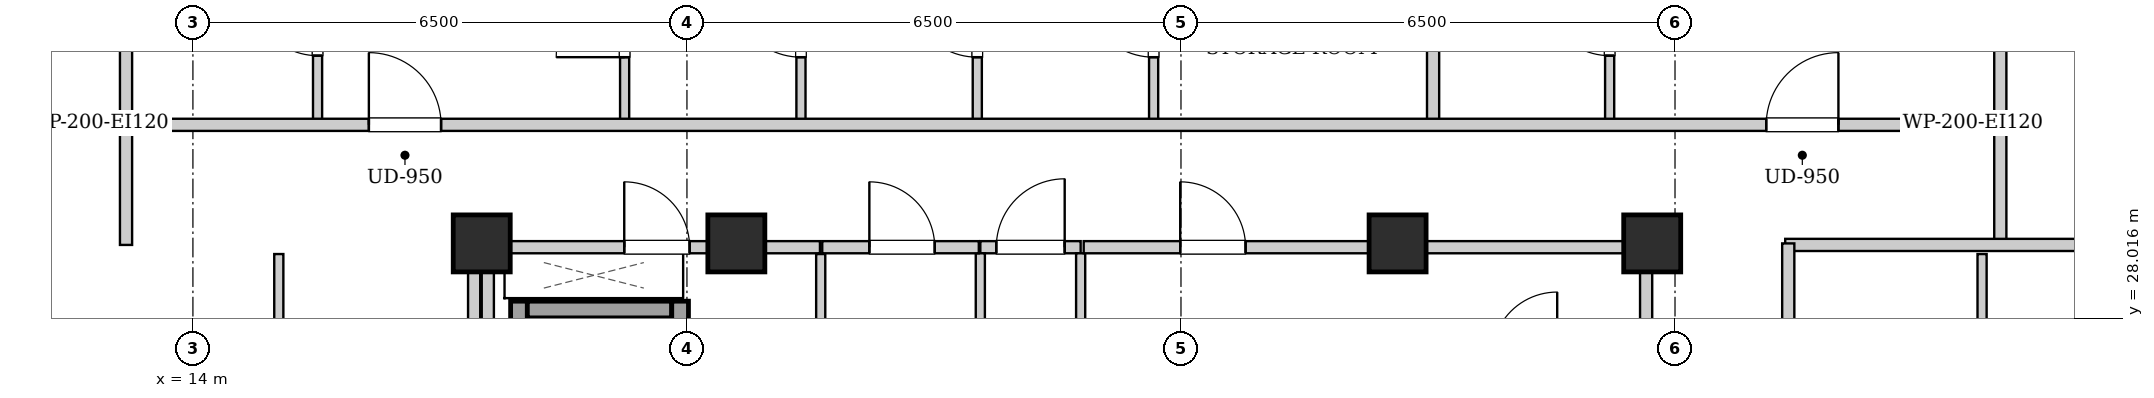
"""IFC4 building model, lengths in metres.
Left out: names, types, materials, properties, quantities, classifications, styles, units other than length and angle.
Written with IfcOpenShell. Run it as: python <this file> out.ifc"""

import sys

from ifc_helpers import new_model, si_unit, direction, frame, frame_2d, origin, origin_2d, place, context, subcontext, project, spatial, rectangle, extrude, element, fill, save


model = new_model("IFC4")
c1 = context("Model", 3, precision=1e-05, world=origin(), true_north=direction((0.0, 1.0)))
c2 = subcontext(c1, "Body", "Model", "MODEL_VIEW")
j1 = project(units=[si_unit("LENGTHUNIT", "METRE"), si_unit("PLANEANGLEUNIT", "RADIAN")], contexts=[c1])
p1 = place(None, origin())
s1 = spatial("IfcSite", under=j1, at=p1, CompositionType="ELEMENT")
p2 = place(p1, origin())
s2 = spatial("IfcBuilding", under=s1, at=p2, CompositionType="ELEMENT")
p3 = place(p2, frame((0.0, 0.0, 258.1)))
s3 = spatial("IfcBuildingStorey", under=s2, at=p3, CompositionType="ELEMENT", Elevation=258.1)
for number, where, z_axis, x_axis in (
    (1, (17.8, 29.0, 0.0), (0.0, 0.0, 1.0), (1.0, 0.0, 0.0)),
    (2, (21.15, 29.0, 0.0), (0.0, 0.0, 1.0), (1.0, 0.0, 0.0)),
    (3, (29.85, 29.0, 0.0), (0.0, 0.0, 1.0), (1.0, 0.0, 0.0)),
    (4, (33.2, 29.0, 0.0), (0.0, 0.0, 1.0), (1.0, 0.0, 0.0)),
):
    element("IfcColumn", number, at=place(p3, frame(where, z_axis=z_axis, x_axis=x_axis)), inside=s3, PredefinedType="COLUMN", context=c2, shape_type="SweptSolid", body=[
        extrude(rectangle(XDim=0.75, YDim=0.75, at=origin_2d()), origin(), (0.0, 0.0, 1.0), 3.4),
    ])
p4 = place(p3, frame((18.29, 24.1, 0.0), z_axis=(0.0, 0.0, 1.0), x_axis=(0.0, 1.0, 0.0)))
e5 = element("IfcWall", 5, at=p4, inside=s3, PredefinedType="SHEAR", context=c2, shape_type="SweptSolid", body=[
    extrude(rectangle(XDim=4.14, YDim=0.22, at=frame_2d((2.07, 0.0))), origin(), (0.0, 0.0, 1.0), 3.05),
])
p5 = place(p3, frame((18.4, 28.13, 0.0), z_axis=(0.0, 0.0, 1.0), x_axis=(1.0, 0.0, 0.0)))
e6 = element("IfcWall", 6, at=p5, inside=s3, PredefinedType="SHEAR", context=c2, shape_type="SweptSolid", body=[
    extrude(rectangle(XDim=1.9, YDim=0.22, at=frame_2d((0.95, 0.0))), origin(), (0.0, 0.0, 1.0), 3.05),
])
p6 = place(p3, frame((20.41, 26.06, 0.0), z_axis=(0.0, 0.0, 1.0), x_axis=(0.0, 1.0, 0.0)))
e7 = element("IfcWall", 7, at=p6, inside=s3, PredefinedType="SHEAR", context=c2, shape_type="SweptSolid", body=[
    extrude(rectangle(XDim=2.18, YDim=0.22, at=frame_2d((1.09, 0.0))), origin(), (0.0, 0.0, 1.0), 3.05),
])
p7 = place(p6, frame((0.54, 0.0, 0.0)))
e8 = element("IfcOpeningElement", 8, at=p7, cuts=e7, PredefinedType="OPENING", context=c2, shape_type="SweptSolid", body=[
    extrude(rectangle(XDim=1.1, YDim=2.15, at=frame_2d((0.55, 1.075))), frame((0.0, 0.12, 0.0), z_axis=(0.0, -1.0, 0.0), x_axis=(1.0, 0.0, 0.0)), (0.0, 0.0, 1.0), 0.24),
])
for number, where, z_axis, x_axis in (
    (9, (17.88, 24.12, 0.0), (0.0, 0.0, 1.0), (0.0, 1.0, 0.0)),
    (10, (33.12, 24.12, 0.0), (0.0, 0.0, 1.0), (0.0, 1.0, 0.0)),
):
    element("IfcWall", number, at=place(p3, frame(where, z_axis=z_axis, x_axis=x_axis)), inside=s3, PredefinedType="PARTITIONING", context=c2, shape_type="SweptSolid", body=[
        extrude(rectangle(XDim=4.76, YDim=0.16, at=frame_2d((2.38, 0.0))), origin(), (0.0, 0.0, 1.0), 2.385),
    ])
p8 = place(p3, frame((24.36, 28.95, 0.0), z_axis=(0.0, 0.0, 1.0), x_axis=(1.0, 0.0, 0.0)))
e11 = element("IfcWall", 11, at=p8, inside=s3, PredefinedType="PARTITIONING", context=c2, shape_type="SweptSolid", body=[
    extrude(rectangle(XDim=1.32, YDim=0.16, at=frame_2d((0.66, 0.0))), origin(), (0.0, 0.0, 1.0), 2.578),
])
p9 = place(p8, frame((0.21, 0.0, 0.0)))
e12 = element("IfcOpeningElement", 12, at=p9, cuts=e11, PredefinedType="OPENING", context=c2, shape_type="SweptSolid", body=[
    extrude(rectangle(XDim=0.9, YDim=2.05, at=frame_2d((0.45, 1.025))), frame((0.0, 0.09, 0.0), z_axis=(0.0, -1.0, 0.0), x_axis=(1.0, 0.0, 0.0)), (0.0, 0.0, 1.0), 0.18),
])
p10 = place(p3, frame((17.96, 28.95, 0.0), z_axis=(0.0, 0.0, 1.0), x_axis=(1.0, 0.0, 0.0)))
e13 = element("IfcWall", 13, at=p10, inside=s3, PredefinedType="PARTITIONING", context=c2, shape_type="SweptSolid", body=[
    extrude(rectangle(XDim=4.29, YDim=0.16, at=frame_2d((2.145, 0.0))), origin(), (0.0, 0.0, 1.0), 2.578),
])
p11 = place(p10, frame((1.715, 0.0, 0.0)))
e14 = element("IfcOpeningElement", 14, at=p11, cuts=e13, PredefinedType="OPENING", context=c2, shape_type="SweptSolid", body=[
    extrude(rectangle(XDim=0.86, YDim=2.05, at=frame_2d((0.43, 1.025))), frame((0.0, 0.09, 0.0), z_axis=(0.0, -1.0, 0.0), x_axis=(1.0, 0.0, 0.0)), (0.0, 0.0, 1.0), 0.18),
])
for number, where, z_axis, x_axis in (
    (15, (24.36, 25.0, 0.0), (0.0, 0.0, 1.0), (0.0, 1.0, 0.0)),
    (16, (25.68, 25.0, 0.0), (0.0, 0.0, 1.0), (0.0, 1.0, 0.0)),
):
    element("IfcWall", number, at=place(p3, frame(where, z_axis=z_axis, x_axis=x_axis)), inside=s3, PredefinedType="PARTITIONING", context=c2, shape_type="SweptSolid", body=[
        extrude(rectangle(XDim=3.87, YDim=0.12, at=frame_2d((1.935, 0.0))), origin(), (0.0, 0.0, 1.0), 3.05),
    ])
p12 = place(p3, frame((22.26, 25.0, 0.0), z_axis=(0.0, 0.0, 1.0), x_axis=(0.0, 1.0, 0.0)))
e17 = element("IfcWall", 17, at=p12, inside=s3, PredefinedType="PARTITIONING", context=c2, shape_type="SweptSolid", body=[
    extrude(rectangle(XDim=3.86, YDim=0.12, at=frame_2d((1.93, 0.0))), origin(), (0.0, 0.0, 1.0), 3.05),
])
p13 = place(p3, frame((22.28, 28.95, 0.0), z_axis=(0.0, 0.0, 1.0), x_axis=(1.0, 0.0, 0.0)))
e18 = element("IfcWall", 18, at=p13, inside=s3, PredefinedType="PARTITIONING", context=c2, shape_type="SweptSolid", body=[
    extrude(rectangle(XDim=2.06, YDim=0.16, at=frame_2d((1.03, 0.0))), origin(), (0.0, 0.0, 1.0), 2.578),
])
p14 = place(p13, frame((0.62, 0.0, 0.0)))
e19 = element("IfcOpeningElement", 19, at=p14, cuts=e18, PredefinedType="OPENING", context=c2, shape_type="SweptSolid", body=[
    extrude(rectangle(XDim=0.86, YDim=2.05, at=frame_2d((0.43, 1.025))), frame((0.0, 0.09, 0.0), z_axis=(0.0, -1.0, 0.0), x_axis=(1.0, 0.0, 0.0)), (0.0, 0.0, 1.0), 0.18),
])
p15 = place(p3, frame((25.72, 28.95, 0.0), z_axis=(0.0, 0.0, 1.0), x_axis=(1.0, 0.0, 0.0)))
e20 = element("IfcWall", 20, at=p15, inside=s3, PredefinedType="PARTITIONING", context=c2, shape_type="SweptSolid", body=[
    extrude(rectangle(XDim=7.32, YDim=0.16, at=frame_2d((3.66, 0.0))), origin(), (0.0, 0.0, 1.0), 2.578),
])
p16 = place(p15, frame((1.27, 0.0, 0.0)))
e21 = element("IfcOpeningElement", 21, at=p16, cuts=e20, PredefinedType="OPENING", context=c2, shape_type="SweptSolid", body=[
    extrude(rectangle(XDim=0.86, YDim=2.05, at=frame_2d((0.43, 1.025))), frame((0.0, 0.09, 0.0), z_axis=(0.0, -1.0, 0.0), x_axis=(1.0, 0.0, 0.0)), (0.0, 0.0, 1.0), 0.18),
])
for number, where, z_axis, x_axis in (
    (22, (13.12, 28.98, 0.0), (0.0, 0.0, 1.0), (0.0, 1.0, 0.0)),
    (23, (37.78, 28.98, 0.0), (0.0, 0.0, 1.0), (0.0, 1.0, 0.0)),
):
    element("IfcWall", number, at=place(p3, frame(where, z_axis=z_axis, x_axis=x_axis)), inside=s3, PredefinedType="PARTITIONING", context=c2, shape_type="SweptSolid", body=[
        extrude(rectangle(XDim=1.58, YDim=0.16, at=frame_2d((0.79, 0.0))), origin(), (0.0, 0.0, 1.0), 3.05),
    ])
p17 = place(p3, frame((34.95, 28.98, 0.0), z_axis=(0.0, 0.0, 1.0), x_axis=(1.0, 0.0, 0.0)))
e24 = element("IfcWall", 24, at=p17, inside=s3, PredefinedType="PARTITIONING", context=c2, shape_type="SweptSolid", body=[
    extrude(rectangle(XDim=5.07, YDim=0.16, at=frame_2d((2.535, 0.0))), origin(), (0.0, 0.0, 1.0), 2.578),
])
p18 = place(p3, frame((13.12, 30.6, 0.0), z_axis=(0.0, 0.0, 1.0), x_axis=(0.0, 1.0, 0.0)))
e25 = element("IfcWall", 25, at=p18, inside=s3, PredefinedType="PARTITIONING", context=c2, shape_type="SweptSolid", body=[
    extrude(rectangle(XDim=2.66, YDim=0.16, at=frame_2d((1.33, 0.0))), origin(), (0.0, 0.0, 1.0), 3.05),
])
p19 = place(p3, frame((15.64, 30.6, 0.0), z_axis=(0.0, 0.0, 1.0), x_axis=(0.0, 1.0, 0.0)))
e26 = element("IfcWall", 26, at=p19, inside=s3, PredefinedType="PARTITIONING", context=c2, shape_type="SweptSolid", body=[
    extrude(rectangle(XDim=2.6, YDim=0.12, at=frame_2d((1.3, 0.0))), origin(), (0.0, 0.0, 1.0), 3.05),
])
p20 = place(p19, frame((0.87, 0.0, 0.0)))
e27 = element("IfcOpeningElement", 27, at=p20, cuts=e26, PredefinedType="OPENING", context=c2, shape_type="SweptSolid", body=[
    extrude(rectangle(XDim=0.86, YDim=2.05, at=frame_2d((0.43, 1.025))), frame((0.0, 0.07, 0.0), z_axis=(0.0, -1.0, 0.0), x_axis=(1.0, 0.0, 0.0)), (0.0, 0.0, 1.0), 0.14),
])
p21 = place(p3, frame((19.68, 30.6, 0.0), z_axis=(0.0, 0.0, 1.0), x_axis=(0.0, 1.0, 0.0)))
e28 = element("IfcWall", 28, at=p21, inside=s3, PredefinedType="PARTITIONING", context=c2, shape_type="SweptSolid", body=[
    extrude(rectangle(XDim=2.6, YDim=0.12, at=frame_2d((1.3, 0.0))), origin(), (0.0, 0.0, 1.0), 3.05),
])
p22 = place(p21, frame((0.85, 0.0, 0.0)))
e29 = element("IfcOpeningElement", 29, at=p22, cuts=e28, PredefinedType="OPENING", context=c2, shape_type="SweptSolid", body=[
    extrude(rectangle(XDim=0.9, YDim=2.05, at=frame_2d((0.45, 1.025))), frame((0.0, 0.07, 0.0), z_axis=(0.0, -1.0, 0.0), x_axis=(1.0, 0.0, 0.0)), (0.0, 0.0, 1.0), 0.14),
])
p23 = place(p3, frame((22.0, 30.6, 0.0), z_axis=(0.0, 0.0, 1.0), x_axis=(0.0, 1.0, 0.0)))
e30 = element("IfcWall", 30, at=p23, inside=s3, PredefinedType="PARTITIONING", context=c2, shape_type="SweptSolid", body=[
    extrude(rectangle(XDim=2.6, YDim=0.12, at=frame_2d((1.3, 0.0))), origin(), (0.0, 0.0, 1.0), 3.05),
])
p24 = place(p23, frame((0.85, 0.0, 0.0)))
e31 = element("IfcOpeningElement", 31, at=p24, cuts=e30, PredefinedType="OPENING", context=c2, shape_type="SweptSolid", body=[
    extrude(rectangle(XDim=0.9, YDim=2.05, at=frame_2d((0.45, 1.025))), frame((0.0, 0.07, 0.0), z_axis=(0.0, -1.0, 0.0), x_axis=(1.0, 0.0, 0.0)), (0.0, 0.0, 1.0), 0.14),
])
p25 = place(p3, frame((24.32, 30.6, 0.0), z_axis=(0.0, 0.0, 1.0), x_axis=(0.0, 1.0, 0.0)))
e32 = element("IfcWall", 32, at=p25, inside=s3, PredefinedType="PARTITIONING", context=c2, shape_type="SweptSolid", body=[
    extrude(rectangle(XDim=2.6, YDim=0.12, at=frame_2d((1.3, 0.0))), origin(), (0.0, 0.0, 1.0), 3.05),
])
p26 = place(p25, frame((0.85, 0.0, 0.0)))
e33 = element("IfcOpeningElement", 33, at=p26, cuts=e32, PredefinedType="OPENING", context=c2, shape_type="SweptSolid", body=[
    extrude(rectangle(XDim=0.9, YDim=2.05, at=frame_2d((0.45, 1.025))), frame((0.0, 0.07, 0.0), z_axis=(0.0, -1.0, 0.0), x_axis=(1.0, 0.0, 0.0)), (0.0, 0.0, 1.0), 0.14),
])
p27 = place(p3, frame((26.64, 30.6, 0.0), z_axis=(0.0, 0.0, 1.0), x_axis=(0.0, 1.0, 0.0)))
e34 = element("IfcWall", 34, at=p27, inside=s3, PredefinedType="PARTITIONING", context=c2, shape_type="SweptSolid", body=[
    extrude(rectangle(XDim=2.6, YDim=0.12, at=frame_2d((1.3, 0.0))), origin(), (0.0, 0.0, 1.0), 3.05),
])
p28 = place(p27, frame((0.85, 0.0, 0.0)))
e35 = element("IfcOpeningElement", 35, at=p28, cuts=e34, PredefinedType="OPENING", context=c2, shape_type="SweptSolid", body=[
    extrude(rectangle(XDim=0.9, YDim=2.05, at=frame_2d((0.45, 1.025))), frame((0.0, 0.07, 0.0), z_axis=(0.0, -1.0, 0.0), x_axis=(1.0, 0.0, 0.0)), (0.0, 0.0, 1.0), 0.14),
])
p29 = place(p3, frame((37.78, 30.6, 0.0), z_axis=(0.0, 0.0, 1.0), x_axis=(0.0, 1.0, 0.0)))
e36 = element("IfcWall", 36, at=p29, inside=s3, PredefinedType="PARTITIONING", context=c2, shape_type="SweptSolid", body=[
    extrude(rectangle(XDim=2.66, YDim=0.16, at=frame_2d((1.33, 0.0))), origin(), (0.0, 0.0, 1.0), 3.05),
])
p30 = place(p3, frame((30.317, 30.6, 0.0), z_axis=(0.0, 0.0, 1.0), x_axis=(0.0, 1.0, 0.0)))
e37 = element("IfcWall", 37, at=p30, inside=s3, PredefinedType="PARTITIONING", context=c2, shape_type="SweptSolid", body=[
    extrude(rectangle(XDim=9.32, YDim=0.16, at=frame_2d((4.66, 0.0))), origin(), (0.0, 0.0, 1.0), 3.05),
])
p31 = place(p3, frame((32.64, 30.6, 0.0), z_axis=(0.0, 0.0, 1.0), x_axis=(0.0, 1.0, 0.0)))
e38 = element("IfcWall", 38, at=p31, inside=s3, PredefinedType="PARTITIONING", context=c2, shape_type="SweptSolid", body=[
    extrude(rectangle(XDim=2.6, YDim=0.12, at=frame_2d((1.3, 0.0))), origin(), (0.0, 0.0, 1.0), 3.05),
])
p32 = place(p31, frame((0.87, 0.0, 0.0)))
e39 = element("IfcOpeningElement", 39, at=p32, cuts=e38, PredefinedType="OPENING", context=c2, shape_type="SweptSolid", body=[
    extrude(rectangle(XDim=0.86, YDim=2.05, at=frame_2d((0.43, 1.025))), frame((0.0, 0.07, 0.0), z_axis=(0.0, -1.0, 0.0), x_axis=(1.0, 0.0, 0.0)), (0.0, 0.0, 1.0), 0.14),
])
p33 = place(p3, frame((15.13, 24.552, 0.0), z_axis=(0.0, 0.0, 1.0), x_axis=(0.0, 1.0, 0.0)))
e40 = element("IfcWall", 40, at=p33, inside=s3, PredefinedType="PARTITIONING", context=c2, shape_type="SweptSolid", body=[
    extrude(rectangle(XDim=4.308, YDim=0.12, at=frame_2d((2.154, 0.0))), origin(), (0.0, 0.0, 1.0), 3.05),
])
p34 = place(p33, frame((1.704, 0.0, 0.0)))
e41 = element("IfcOpeningElement", 41, at=p34, cuts=e40, PredefinedType="OPENING", context=c2, shape_type="SweptSolid", body=[
    extrude(rectangle(XDim=0.9, YDim=2.05, at=frame_2d((0.45, 1.025))), frame((0.0, 0.07, 0.0), z_axis=(0.0, -1.0, 0.0), x_axis=(1.0, 0.0, 0.0)), (0.0, 0.0, 1.0), 0.14),
])
p35 = place(p3, frame((37.54, 24.552, 0.0), z_axis=(0.0, 0.0, 1.0), x_axis=(0.0, 1.0, 0.0)))
e42 = element("IfcWall", 42, at=p35, inside=s3, PredefinedType="PARTITIONING", context=c2, shape_type="SweptSolid", body=[
    extrude(rectangle(XDim=4.308, YDim=0.12, at=frame_2d((2.154, 0.0))), origin(), (0.0, 0.0, 1.0), 3.05),
])
p36 = place(p35, frame((1.704, 0.0, 0.0)))
e43 = element("IfcOpeningElement", 43, at=p36, cuts=e42, PredefinedType="OPENING", context=c2, shape_type="SweptSolid", body=[
    extrude(rectangle(XDim=0.9, YDim=2.05, at=frame_2d((0.45, 1.025))), frame((0.0, 0.07, 0.0), z_axis=(0.0, -1.0, 0.0), x_axis=(1.0, 0.0, 0.0)), (0.0, 0.0, 1.0), 0.14),
])
p37 = place(p3, frame((13.15, 30.56, 0.0), z_axis=(0.0, 0.0, 1.0), x_axis=(1.0, 0.0, 0.0)))
e44 = element("IfcWall", 44, at=p37, inside=s3, PredefinedType="PARTITIONING", context=c2, shape_type="SweptSolid", body=[
    extrude(rectangle(XDim=24.6, YDim=0.16, at=frame_2d((12.3, 0.0))), origin(), (0.0, 0.0, 1.0), 3.05),
])
p38 = place(p37, frame((3.165, 0.0, 0.0)))
e45 = element("IfcOpeningElement", 45, at=p38, cuts=e44, PredefinedType="OPENING", context=c2, shape_type="SweptSolid", body=[
    extrude(rectangle(XDim=0.95, YDim=2.1, at=frame_2d((0.475, 1.05))), frame((0.0, 0.09, 0.0), z_axis=(0.0, -1.0, 0.0), x_axis=(1.0, 0.0, 0.0)), (0.0, 0.0, 1.0), 0.18),
])
p39 = place(p37, frame((21.55, 0.0, 0.0)))
e46 = element("IfcOpeningElement", 46, at=p39, cuts=e44, PredefinedType="OPENING", context=c2, shape_type="SweptSolid", body=[
    extrude(rectangle(XDim=0.95, YDim=2.1, at=frame_2d((0.475, 1.05))), frame((0.0, 0.09, 0.0), z_axis=(0.0, -1.0, 0.0), x_axis=(1.0, 0.0, 0.0)), (0.0, 0.0, 1.0), 0.18),
])
p40 = place(p3, frame((17.7, 15.02, 0.0), z_axis=(0.0, 0.0, 1.0), x_axis=(0.0, 1.0, 0.0)))
e47 = element("IfcWall", 47, at=p40, inside=s3, PredefinedType="PARTITIONING", context=c2, shape_type="SweptSolid", body=[
    extrude(rectangle(XDim=13.98, YDim=0.16, at=frame_2d((6.99, 0.0))), origin(), (0.0, 0.0, 1.0), 2.385),
])
p41 = place(p3, frame((34.99, 15.07, 0.0), z_axis=(0.0, 0.0, 1.0), x_axis=(0.0, 1.0, 0.0)))
e48 = element("IfcWall", 48, at=p41, inside=s3, PredefinedType="PARTITIONING", context=c2, shape_type="SweptSolid", body=[
    extrude(rectangle(XDim=13.93, YDim=0.16, at=frame_2d((6.965, 0.0))), origin(), (0.0, 0.0, 1.0), 3.05),
])
p42 = place(p41, frame((4.385, 0.0, 0.0)))
e49 = element("IfcOpeningElement", 49, at=p42, cuts=e48, PredefinedType="OPENING", context=c2, shape_type="SweptSolid", body=[
    extrude(rectangle(XDim=0.95, YDim=2.1, at=frame_2d((0.475, 1.05))), frame((0.0, 0.09, 0.0), z_axis=(0.0, -1.0, 0.0), x_axis=(1.0, 0.0, 0.0)), (0.0, 0.0, 1.0), 0.18),
])
p43 = place(p9, origin())
e50 = element("IfcDoor", 50, at=p43, inside=s3, OperationType="SINGLE_SWING_RIGHT", PredefinedType="DOOR", context=c2, shape_type="SweptSolid", body=[
    extrude(rectangle(XDim=0.9, YDim=2.05, at=frame_2d((0.45, 1.025))), frame((0.0, 0.025, 0.0), z_axis=(0.0, -1.0, 0.0), x_axis=(1.0, 0.0, 0.0)), (0.0, 0.0, 1.0), 0.05),
])
fill(e12, e50)
p44 = place(p11, origin())
e51 = element("IfcDoor", 51, at=p44, inside=s3, OperationType="SINGLE_SWING_LEFT", PredefinedType="DOOR", context=c2, shape_type="SweptSolid", body=[
    extrude(rectangle(XDim=0.86, YDim=2.05, at=frame_2d((0.43, 1.025))), frame((0.0, 0.025, 0.0), z_axis=(0.0, -1.0, 0.0), x_axis=(1.0, 0.0, 0.0)), (0.0, 0.0, 1.0), 0.05),
])
fill(e14, e51)
p45 = place(p14, origin())
e52 = element("IfcDoor", 52, at=p45, inside=s3, OperationType="SINGLE_SWING_LEFT", PredefinedType="DOOR", context=c2, shape_type="SweptSolid", body=[
    extrude(rectangle(XDim=0.86, YDim=2.05, at=frame_2d((0.43, 1.025))), frame((0.0, 0.025, 0.0), z_axis=(0.0, -1.0, 0.0), x_axis=(1.0, 0.0, 0.0)), (0.0, 0.0, 1.0), 0.05),
])
fill(e19, e52)
p46 = place(p16, origin())
e53 = element("IfcDoor", 53, at=p46, inside=s3, OperationType="SINGLE_SWING_LEFT", PredefinedType="DOOR", context=c2, shape_type="SweptSolid", body=[
    extrude(rectangle(XDim=0.86, YDim=2.05, at=frame_2d((0.43, 1.025))), frame((0.0, 0.025, 0.0), z_axis=(0.0, -1.0, 0.0), x_axis=(1.0, 0.0, 0.0)), (0.0, 0.0, 1.0), 0.05),
])
fill(e21, e53)
p47 = place(p20, origin())
e54 = element("IfcDoor", 54, at=p47, inside=s3, OperationType="SINGLE_SWING_RIGHT", PredefinedType="DOOR", context=c2, shape_type="SweptSolid", body=[
    extrude(rectangle(XDim=0.86, YDim=2.05, at=frame_2d((0.43, 1.025))), frame((0.0, 0.025, 0.0), z_axis=(0.0, -1.0, 0.0), x_axis=(1.0, 0.0, 0.0)), (0.0, 0.0, 1.0), 0.05),
])
fill(e27, e54)
p48 = place(p22, origin())
e55 = element("IfcDoor", 55, at=p48, inside=s3, OperationType="SINGLE_SWING_LEFT", PredefinedType="DOOR", context=c2, shape_type="SweptSolid", body=[
    extrude(rectangle(XDim=0.9, YDim=2.05, at=frame_2d((0.45, 1.025))), frame((0.0, 0.025, 0.0), z_axis=(0.0, -1.0, 0.0), x_axis=(1.0, 0.0, 0.0)), (0.0, 0.0, 1.0), 0.05),
])
fill(e29, e55)
p49 = place(p24, origin())
e56 = element("IfcDoor", 56, at=p49, inside=s3, OperationType="SINGLE_SWING_RIGHT", PredefinedType="DOOR", context=c2, shape_type="SweptSolid", body=[
    extrude(rectangle(XDim=0.9, YDim=2.05, at=frame_2d((0.45, 1.025))), frame((0.0, 0.025, 0.0), z_axis=(0.0, -1.0, 0.0), x_axis=(1.0, 0.0, 0.0)), (0.0, 0.0, 1.0), 0.05),
])
fill(e31, e56)
p50 = place(p26, origin())
e57 = element("IfcDoor", 57, at=p50, inside=s3, OperationType="SINGLE_SWING_RIGHT", PredefinedType="DOOR", context=c2, shape_type="SweptSolid", body=[
    extrude(rectangle(XDim=0.9, YDim=2.05, at=frame_2d((0.45, 1.025))), frame((0.0, 0.025, 0.0), z_axis=(0.0, -1.0, 0.0), x_axis=(1.0, 0.0, 0.0)), (0.0, 0.0, 1.0), 0.05),
])
fill(e33, e57)
p51 = place(p28, origin())
e58 = element("IfcDoor", 58, at=p51, inside=s3, OperationType="SINGLE_SWING_RIGHT", PredefinedType="DOOR", context=c2, shape_type="SweptSolid", body=[
    extrude(rectangle(XDim=0.9, YDim=2.05, at=frame_2d((0.45, 1.025))), frame((0.0, 0.025, 0.0), z_axis=(0.0, -1.0, 0.0), x_axis=(1.0, 0.0, 0.0)), (0.0, 0.0, 1.0), 0.05),
])
fill(e35, e58)
p52 = place(p32, origin())
e59 = element("IfcDoor", 59, at=p52, inside=s3, OperationType="SINGLE_SWING_RIGHT", PredefinedType="DOOR", context=c2, shape_type="SweptSolid", body=[
    extrude(rectangle(XDim=0.86, YDim=2.05, at=frame_2d((0.43, 1.025))), frame((0.0, 0.025, 0.0), z_axis=(0.0, -1.0, 0.0), x_axis=(1.0, 0.0, 0.0)), (0.0, 0.0, 1.0), 0.05),
])
fill(e39, e59)
p53 = place(p38, origin())
e60 = element("IfcDoor", 60, at=p53, inside=s3, OperationType="SINGLE_SWING_LEFT", PredefinedType="DOOR", context=c2, shape_type="SweptSolid", body=[
    extrude(rectangle(XDim=0.95, YDim=2.1, at=frame_2d((0.475, 1.05))), frame((0.0, 0.025, 0.0), z_axis=(0.0, -1.0, 0.0), x_axis=(1.0, 0.0, 0.0)), (0.0, 0.0, 1.0), 0.05),
])
fill(e45, e60)
p54 = place(p39, origin())
e61 = element("IfcDoor", 61, at=p54, inside=s3, OperationType="SINGLE_SWING_RIGHT", PredefinedType="DOOR", context=c2, shape_type="SweptSolid", body=[
    extrude(rectangle(XDim=0.95, YDim=2.1, at=frame_2d((0.475, 1.05))), frame((0.0, 0.025, 0.0), z_axis=(0.0, -1.0, 0.0), x_axis=(1.0, 0.0, 0.0)), (0.0, 0.0, 1.0), 0.05),
])
fill(e46, e61)
save(model, sys.argv[1])
